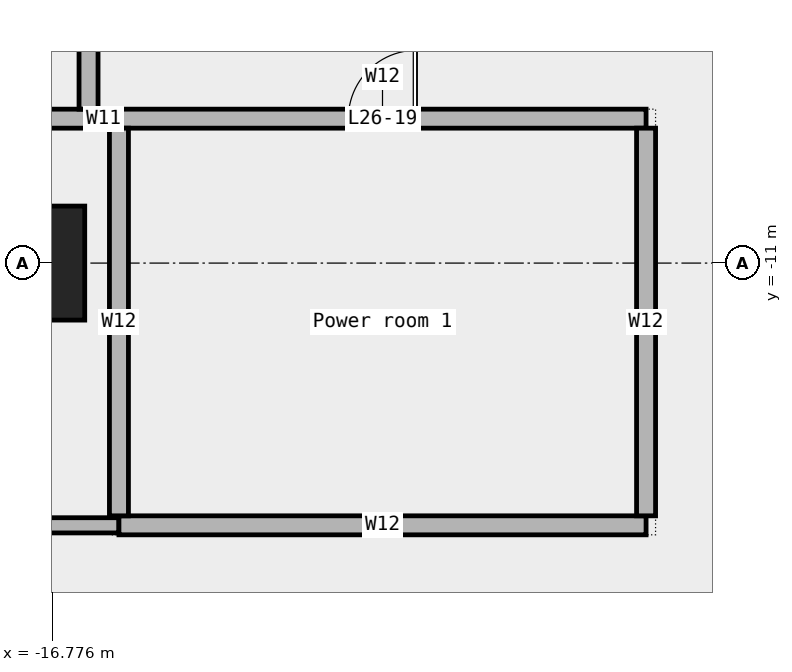
"""IFC4 building model, lengths in metres.
Left out: names, types, materials, properties, quantities, classifications, styles, units other than length and angle.
Written with IfcOpenShell. Run it as: python <this file> out.ifc"""

import sys

from ifc_helpers import new_model, si_unit, direction, frame, frame_2d, origin, origin_2d, place, context, subcontext, project, spatial, rectangle, extrude, element, fill, save


model = new_model("IFC4")
c1 = context("Model", 3, precision=1e-05, world=origin(), true_north=direction((0.0, 1.0)))
c2 = subcontext(c1, "Body", "Model", "MODEL_VIEW")
j1 = project(units=[si_unit("LENGTHUNIT", "METRE"), si_unit("PLANEANGLEUNIT", "RADIAN")], contexts=[c1])
p1 = place(None, origin())
s1 = spatial("IfcSite", under=j1, at=p1, CompositionType="ELEMENT")
p2 = place(p1, origin())
s2 = spatial("IfcBuilding", under=s1, at=p2, CompositionType="ELEMENT")
p3 = place(p2, frame((0.0, 0.0, 130.6)))
s3 = spatial("IfcBuildingStorey", under=s2, at=p3, CompositionType="ELEMENT", Elevation=130.6)
p4 = place(p3, frame((-17.1, -11.0, 0.0), z_axis=(0.0, 0.0, 1.0), x_axis=(1.0, 0.0, 0.0)))
e1 = element("IfcColumn", 1, at=p4, inside=s3, PredefinedType="COLUMN", context=c2, shape_type="SweptSolid", body=[
    extrude(rectangle(XDim=1.5, YDim=1.5, at=origin_2d()), origin(), (0.0, 0.0, 1.0), 4.05),
])
p5 = place(p3, frame((-29.0, -14.45, 0.0), z_axis=(0.0, 0.0, 1.0), x_axis=(1.0, 0.0, 0.0)))
e2 = element("IfcWall", 2, at=p5, inside=s3, PredefinedType="PARTITIONING", context=c2, shape_type="SweptSolid", body=[
    extrude(rectangle(XDim=13.1, YDim=0.2, at=frame_2d((6.55, 0.0))), origin(), (0.0, 0.0, 1.0), 4.05),
])
p6 = place(p5, frame((6.05, 0.0, 0.0)))
e3 = element("IfcOpeningElement", 3, at=p6, cuts=e2, PredefinedType="OPENING", context=c2, shape_type="SweptSolid", body=[
    extrude(rectangle(XDim=1.2, YDim=2.1, at=frame_2d((0.6, 1.05))), frame((0.0, 0.112, 0.0), z_axis=(0.0, -1.0, 0.0), x_axis=(1.0, 0.0, 0.0)), (0.0, 0.0, 1.0), 0.224),
])
p7 = place(p3, frame((-15.9, -14.45, 0.0), z_axis=(0.0, 0.0, 1.0), x_axis=(1.0, 0.0, 0.0)))
e4 = element("IfcWall", 4, at=p7, inside=s3, PredefinedType="PARTITIONING", context=c2, shape_type="SweptSolid", body=[
    extrude(rectangle(XDim=6.935, YDim=0.25, at=frame_2d((3.467, 0.0))), origin(), (0.0, 0.0, 1.0), 4.05),
])
p8 = place(p3, frame((-16.3, -9.1, 0.0), z_axis=(0.0, 0.0, 1.0), x_axis=(1.0, 0.0, 0.0)))
e5 = element("IfcWall", 5, at=p8, inside=s3, PredefinedType="PARTITIONING", context=c2, shape_type="SweptSolid", body=[
    extrude(rectangle(XDim=0.4, YDim=0.2, at=frame_2d((0.2, 0.0))), origin(), (0.0, 0.0, 1.0), 4.05),
])
p9 = place(p3, frame((-29.0, -9.1, 0.0), z_axis=(0.0, 0.0, 1.0), x_axis=(1.0, 0.0, 0.0)))
e6 = element("IfcWall", 6, at=p9, inside=s3, PredefinedType="PARTITIONING", context=c2, shape_type="SweptSolid", body=[
    extrude(rectangle(XDim=12.7, YDim=0.25, at=frame_2d((6.35, 0.0))), origin(), (0.0, 0.0, 1.0), 4.05),
])
p10 = place(p3, frame((-15.9, -9.1, 0.0), z_axis=(0.0, 0.0, 1.0), x_axis=(1.0, 0.0, 0.0)))
e7 = element("IfcWall", 7, at=p10, inside=s3, PredefinedType="PARTITIONING", context=c2, shape_type="SweptSolid", body=[
    extrude(rectangle(XDim=6.935, YDim=0.25, at=frame_2d((3.467, 0.0))), origin(), (0.0, 0.0, 1.0), 4.05),
])
p11 = place(p10, frame((3.018, 0.0, 0.0)))
e8 = element("IfcOpeningElement", 8, at=p11, cuts=e7, PredefinedType="OPENING", context=c2, shape_type="SweptSolid", body=[
    extrude(rectangle(XDim=0.9, YDim=2.1, at=frame_2d((0.45, 1.05))), frame((0.0, 0.137, 0.0), z_axis=(0.0, -1.0, 0.0), x_axis=(1.0, 0.0, 0.0)), (0.0, 0.0, 1.0), 0.274),
])
p12 = place(p3, frame((-16.3, -8.975, 0.0), z_axis=(0.0, 0.0, 1.0), x_axis=(0.0, 1.0, 0.0)))
e9 = element("IfcWall", 9, at=p12, inside=s3, PredefinedType="PARTITIONING", context=c2, shape_type="SweptSolid", body=[
    extrude(rectangle(XDim=8.225, YDim=0.25, at=frame_2d((4.113, 0.0))), origin(), (0.0, 0.0, 1.0), 4.05),
])
p13 = place(p12, frame((3.212, 0.0, 0.0)))
e10 = element("IfcOpeningElement", 10, at=p13, cuts=e9, PredefinedType="OPENING", context=c2, shape_type="SweptSolid", body=[
    extrude(rectangle(XDim=1.8, YDim=2.1, at=frame_2d((0.9, 1.05))), frame((0.0, 0.137, 0.0), z_axis=(0.0, -1.0, 0.0), x_axis=(1.0, 0.0, 0.0)), (0.0, 0.0, 1.0), 0.274),
])
for number, where, z_axis, x_axis in (
    (11, (-15.9, -14.325, 0.0), (0.0, 0.0, 1.0), (0.0, 1.0, 0.0)),
    (12, (-8.965, -14.325, 0.0), (0.0, 0.0, 1.0), (0.0, 1.0, 0.0)),
):
    element("IfcWall", number, at=place(p3, frame(where, z_axis=z_axis, x_axis=x_axis)), inside=s3, PredefinedType="PARTITIONING", context=c2, shape_type="SweptSolid", body=[
        extrude(rectangle(XDim=5.1, YDim=0.25, at=frame_2d((2.55, 0.0))), origin(), (0.0, 0.0, 1.0), 4.05),
    ])
p14 = place(p11, origin())
e13 = element("IfcDoor", 13, at=p14, inside=s3, OperationType="SINGLE_SWING_RIGHT", PredefinedType="DOOR", context=c2, shape_type="SweptSolid", body=[
    extrude(rectangle(XDim=0.9, YDim=2.1, at=frame_2d((0.45, 1.05))), frame((0.0, 0.025, 0.0), z_axis=(0.0, -1.0, 0.0), x_axis=(1.0, 0.0, 0.0)), (0.0, 0.0, 1.0), 0.05),
])
fill(e8, e13)
save(model, sys.argv[1])
